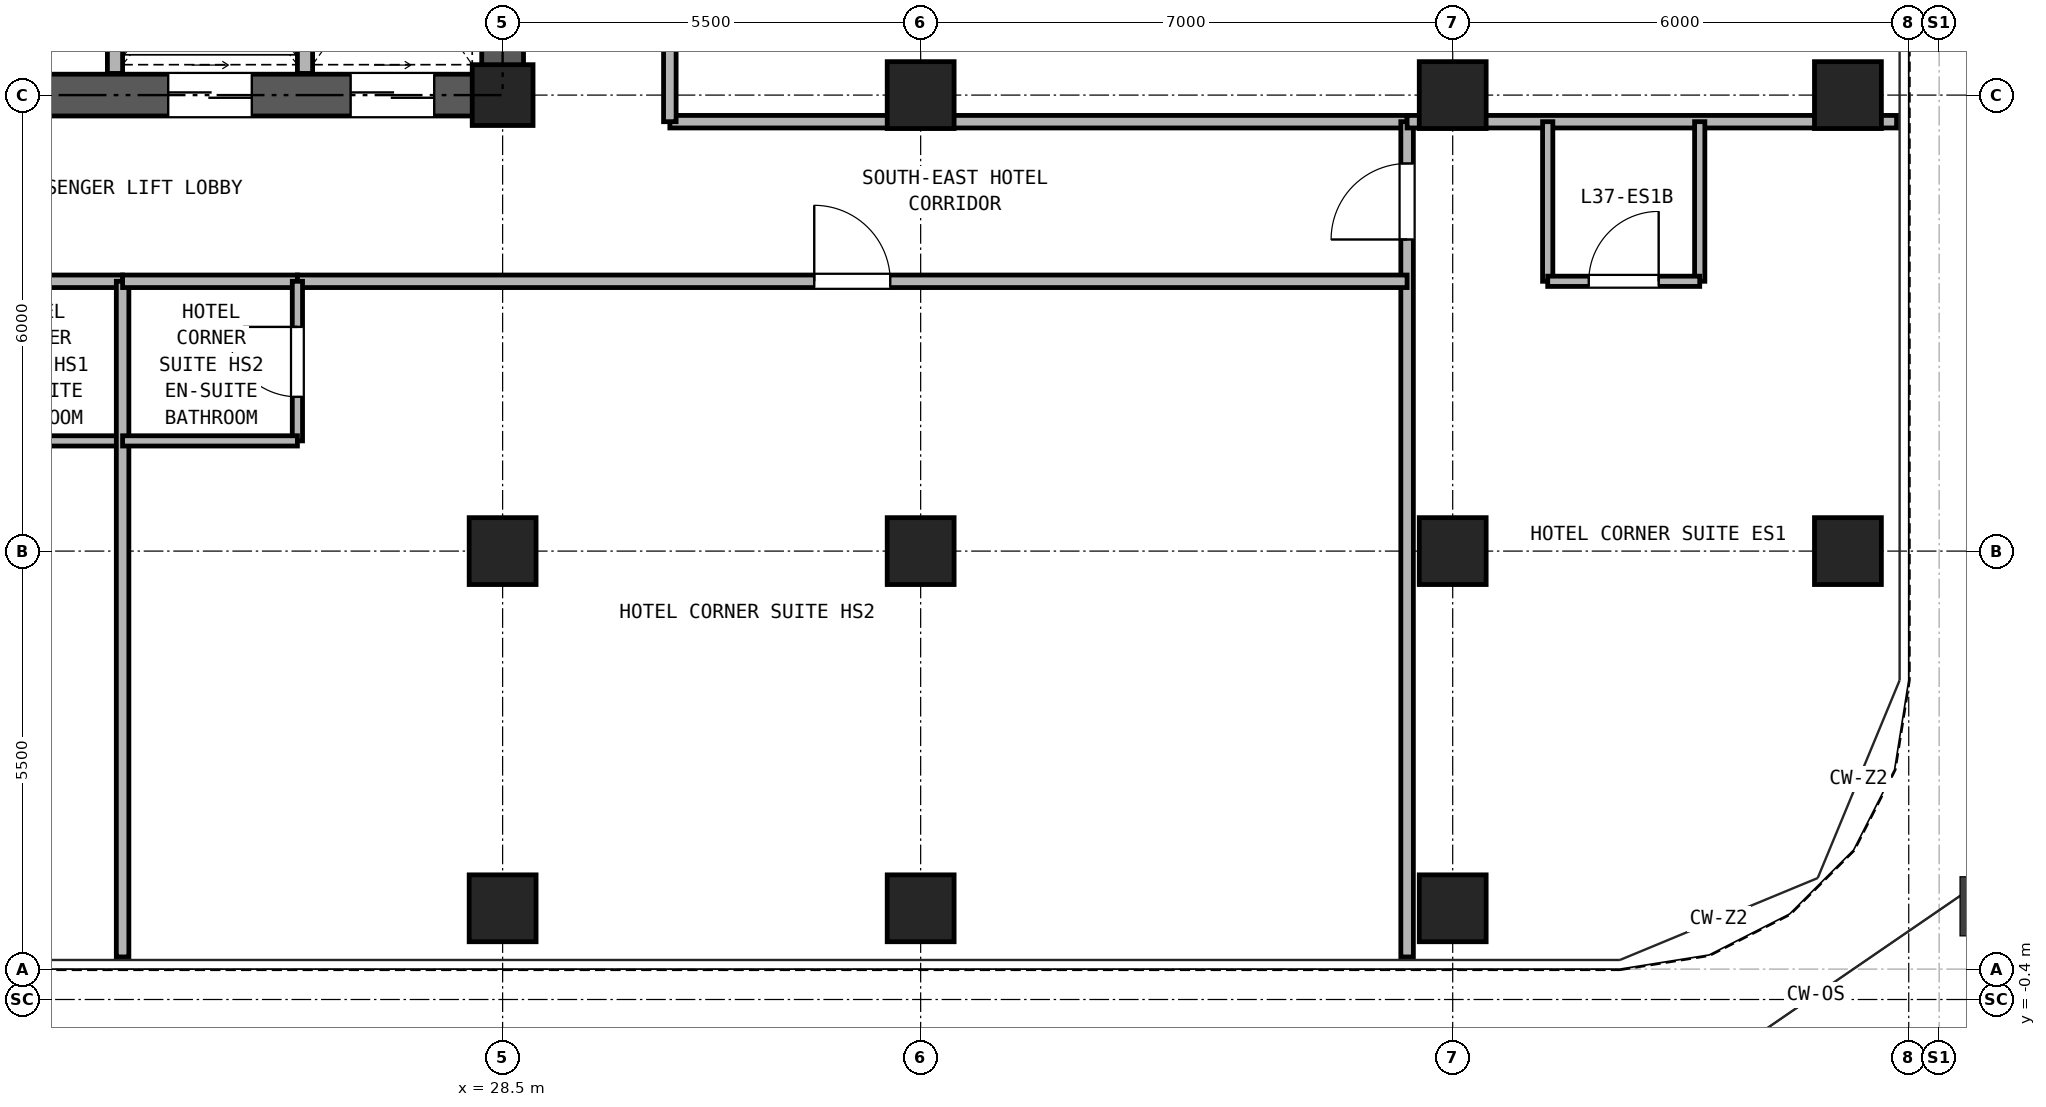
"""IFC4 building model, lengths in metres.
Left out: names, types, materials, properties, quantities, classifications, styles, units other than length and angle.
Written with IfcOpenShell. Run it as: python <this file> out.ifc"""

import sys

from ifc_helpers import new_model, si_unit, direction, frame, frame_2d, origin, origin_2d, place, context, subcontext, project, spatial, rectangle, hollow_rectangle, extrude, source, transform, mapped, element, fill, save


model = new_model("IFC4")
c1 = context("Model", 3, precision=1e-05, world=origin(), true_north=direction((0.0, 1.0)))
c2 = subcontext(c1, "Body", "Model", "MODEL_VIEW")
j1 = project(units=[si_unit("LENGTHUNIT", "METRE"), si_unit("PLANEANGLEUNIT", "RADIAN")], contexts=[c1])
p1 = place(None, origin())
s1 = spatial("IfcSite", under=j1, at=p1, CompositionType="ELEMENT")
p2 = place(p1, origin())
s2 = spatial("IfcBuilding", under=s1, at=p2, CompositionType="ELEMENT")
p3 = place(p2, frame((0.0, 0.0, 134.3)))
s3 = spatial("IfcBuildingStorey", under=s2, at=p3, CompositionType="ELEMENT", Elevation=134.3)
m1 = source(origin(), c2, "Body", "SweptSolid", [
    extrude(hollow_rectangle(XDim=0.88, YDim=0.88, WallThickness=0.05, at=origin_2d()), origin(), (0.0, 0.0, 1.0), 2.95),
])
for number, where, z_axis, x_axis in (
    (1, (28.5, 0.8, 0.0), (0.0, 0.0, 1.0), (1.0, 0.0, 0.0)),
    (2, (34.0, 0.8, 0.0), (0.0, 0.0, 1.0), (1.0, 0.0, 0.0)),
    (3, (41.0, 0.8, 0.0), (0.0, 0.0, 1.0), (1.0, 0.0, 0.0)),
    (4, (46.2, 5.5, 0.0), (0.0, 0.0, 1.0), (1.0, 0.0, 0.0)),
    (5, (46.2, 11.5, 0.0), (0.0, 0.0, 1.0), (1.0, 0.0, 0.0)),
    (6, (28.5, 5.5, 0.0), (0.0, 0.0, 1.0), (1.0, 0.0, 0.0)),
):
    element("IfcColumn", number, at=place(p3, frame(where, z_axis=z_axis, x_axis=x_axis)), inside=s3, PredefinedType="COLUMN", context=c2, shape_type="MappedRepresentation", body=[
        mapped(m1, transform((0.0, 0.0, 0.0), x_axis=(1.0, 0.0, 0.0), y_axis=(0.0, 1.0, 0.0), z_axis=(0.0, 0.0, 1.0), scale=1.0)),
    ])
m2 = source(origin(), c2, "Body", "SweptSolid", [
    extrude(hollow_rectangle(XDim=0.8, YDim=0.8, WallThickness=0.045, at=origin_2d()), origin(), (0.0, 0.0, 1.0), 2.95),
])
p4 = place(p3, frame((28.5, 11.5, 0.0), z_axis=(0.0, 0.0, 1.0), x_axis=(1.0, 0.0, 0.0)))
e7 = element("IfcColumn", 7, at=p4, inside=s3, PredefinedType="COLUMN", context=c2, shape_type="MappedRepresentation", body=[
    mapped(m2, transform((0.0, 0.0, 0.0), x_axis=(1.0, 0.0, 0.0), y_axis=(0.0, 1.0, 0.0), z_axis=(0.0, 0.0, 1.0), scale=1.0)),
])
for number, where, z_axis, x_axis in (
    (8, (34.0, 5.5, 0.0), (0.0, 0.0, 1.0), (1.0, 0.0, 0.0)),
    (9, (34.0, 11.5, 0.0), (0.0, 0.0, 1.0), (1.0, 0.0, 0.0)),
    (10, (41.0, 5.5, 0.0), (0.0, 0.0, 1.0), (1.0, 0.0, 0.0)),
    (11, (41.0, 11.5, 0.0), (0.0, 0.0, 1.0), (1.0, 0.0, 0.0)),
):
    element("IfcColumn", number, at=place(p3, frame(where, z_axis=z_axis, x_axis=x_axis)), inside=s3, PredefinedType="COLUMN", context=c2, shape_type="MappedRepresentation", body=[
        mapped(m1, transform((0.0, 0.0, 0.0), x_axis=(1.0, 0.0, 0.0), y_axis=(0.0, 1.0, 0.0), z_axis=(0.0, 0.0, 1.0), scale=1.0)),
    ])
p5 = place(p3, frame((18.225, 11.5, 0.0), z_axis=(0.0, 0.0, 1.0), x_axis=(1.0, 0.0, 0.0)))
e12 = element("IfcWall", 12, at=p5, inside=s3, PredefinedType="SHEAR", context=c2, shape_type="SweptSolid", body=[
    extrude(rectangle(XDim=10.55, YDim=0.55, at=frame_2d((5.275, 0.0))), origin(), (0.0, 0.0, 1.0), 2.95),
])
p6 = place(p5, frame((2.375, 0.0, 0.0)))
e13 = element("IfcOpeningElement", 13, at=p6, cuts=e12, PredefinedType="OPENING", context=c2, shape_type="SweptSolid", body=[
    extrude(rectangle(XDim=0.95, YDim=2.15, at=frame_2d((0.475, 1.075))), frame((0.0, 0.285, 0.0), z_axis=(0.0, -1.0, 0.0), x_axis=(1.0, 0.0, 0.0)), (0.0, 0.0, 1.0), 0.57),
])
p7 = place(p5, frame((5.875, 0.0, 0.0)))
e14 = element("IfcOpeningElement", 14, at=p7, cuts=e12, PredefinedType="OPENING", context=c2, shape_type="SweptSolid", body=[
    extrude(rectangle(XDim=1.1, YDim=2.25, at=frame_2d((0.55, 1.125))), frame((0.0, 0.285, 0.0), z_axis=(0.0, -1.0, 0.0), x_axis=(1.0, 0.0, 0.0)), (0.0, 0.0, 1.0), 0.57),
])
p8 = place(p5, frame((8.275, 0.0, 0.0)))
e15 = element("IfcOpeningElement", 15, at=p8, cuts=e12, PredefinedType="OPENING", context=c2, shape_type="SweptSolid", body=[
    extrude(rectangle(XDim=1.1, YDim=2.25, at=frame_2d((0.55, 1.125))), frame((0.0, 0.285, 0.0), z_axis=(0.0, -1.0, 0.0), x_axis=(1.0, 0.0, 0.0)), (0.0, 0.0, 1.0), 0.57),
])
p9 = place(p3, frame((28.5, 11.775, 0.0), z_axis=(0.0, 0.0, 1.0), x_axis=(0.0, 1.0, 0.0)))
e16 = element("IfcWall", 16, at=p9, inside=s3, PredefinedType="SHEAR", context=c2, shape_type="SweptSolid", body=[
    extrude(rectangle(XDim=16.7, YDim=0.55, at=frame_2d((8.35, 0.0))), origin(), (0.0, 0.0, 1.0), 2.95),
])
p10 = place(p9, frame((7.375, 0.0, 0.0)))
e17 = element("IfcOpeningElement", 17, at=p10, cuts=e16, PredefinedType="OPENING", context=c2, shape_type="SweptSolid", body=[
    extrude(rectangle(XDim=1.15, YDim=2.2, at=frame_2d((0.575, 1.1))), frame((0.0, 0.285, 0.0), z_axis=(0.0, -1.0, 0.0), x_axis=(1.0, 0.0, 0.0)), (0.0, 0.0, 1.0), 0.57),
])
for number, where, z_axis, x_axis in (
    (18, (23.4, 11.785, 0.0), (0.0, 0.0, 1.0), (0.0, 1.0, 0.0)),
    (19, (25.9, 11.785, 0.0), (0.0, 0.0, 1.0), (0.0, 1.0, 0.0)),
):
    element("IfcWall", number, at=place(p3, frame(where, z_axis=z_axis, x_axis=x_axis)), inside=s3, PredefinedType="PARTITIONING", context=c2, shape_type="SweptSolid", body=[
        extrude(rectangle(XDim=3.215, YDim=0.2, at=frame_2d((1.607, 0.0))), origin(), (0.0, 0.0, 1.0), 2.95),
    ])
p11 = place(p3, frame((30.7, 11.15, 0.0), z_axis=(0.0, 0.0, 1.0), x_axis=(1.0, 0.0, 0.0)))
e20 = element("IfcWall", 20, at=p11, inside=s3, PredefinedType="PARTITIONING", context=c2, shape_type="SweptSolid", body=[
    extrude(rectangle(XDim=9.7, YDim=0.165, at=frame_2d((4.85, 0.0))), origin(), (0.0, 0.0, 1.0), 2.95),
])
p12 = place(p3, frame((30.7, 11.15, 0.0), z_axis=(0.0, 0.0, 1.0), x_axis=(0.0, 1.0, 0.0)))
e21 = element("IfcWall", 21, at=p12, inside=s3, PredefinedType="PARTITIONING", context=c2, shape_type="SweptSolid", body=[
    extrude(rectangle(XDim=18.7, YDim=0.165, at=frame_2d((9.35, 0.0))), origin(), (0.0, 0.0, 1.0), 2.95),
])
p13 = place(p12, frame((4.175, 0.0, 0.0)))
e22 = element("IfcOpeningElement", 22, at=p13, cuts=e21, PredefinedType="OPENING", context=c2, shape_type="SweptSolid", body=[
    extrude(rectangle(XDim=0.95, YDim=2.15, at=frame_2d((0.475, 1.075))), frame((0.0, 0.093, 0.0), z_axis=(0.0, -1.0, 0.0), x_axis=(1.0, 0.0, 0.0)), (0.0, 0.0, 1.0), 0.185),
])
p14 = place(p12, frame((13.525, 0.0, 0.0)))
e23 = element("IfcOpeningElement", 23, at=p14, cuts=e21, PredefinedType="OPENING", context=c2, shape_type="SweptSolid", body=[
    extrude(rectangle(XDim=0.95, YDim=2.15, at=frame_2d((0.475, 1.075))), frame((0.0, 0.093, 0.0), z_axis=(0.0, -1.0, 0.0), x_axis=(1.0, 0.0, 0.0)), (0.0, 0.0, 1.0), 0.185),
])
p15 = place(p3, frame((40.4, 0.16, 0.0), z_axis=(0.0, 0.0, 1.0), x_axis=(0.0, 1.0, 0.0)))
e24 = element("IfcWall", 24, at=p15, inside=s3, PredefinedType="PARTITIONING", context=c2, shape_type="SweptSolid", body=[
    extrude(rectangle(XDim=10.99, YDim=0.165, at=frame_2d((5.495, 0.0))), origin(), (0.0, 0.0, 1.0), 2.95),
])
p16 = place(p15, frame((9.44, 0.0, 0.0)))
e25 = element("IfcOpeningElement", 25, at=p16, cuts=e24, PredefinedType="OPENING", context=c2, shape_type="SweptSolid", body=[
    extrude(rectangle(XDim=1.0, YDim=2.15, at=frame_2d((0.5, 1.075))), frame((0.0, 0.093, 0.0), z_axis=(0.0, -1.0, 0.0), x_axis=(1.0, 0.0, 0.0)), (0.0, 0.0, 1.0), 0.185),
])
p17 = place(p3, frame((40.4, 11.15, 0.0), z_axis=(0.0, 0.0, 1.0), x_axis=(1.0, 0.0, 0.0)))
e26 = element("IfcWall", 26, at=p17, inside=s3, PredefinedType="PARTITIONING", context=c2, shape_type="SweptSolid", body=[
    extrude(rectangle(XDim=6.44, YDim=0.165, at=frame_2d((3.22, 0.0))), origin(), (0.0, 0.0, 1.0), 2.95),
])
for number, where, z_axis, x_axis in (
    (27, (42.25, 9.05, 0.0), (0.0, 0.0, 1.0), (0.0, 1.0, 0.0)),
    (28, (44.25, 9.05, 0.0), (0.0, 0.0, 1.0), (0.0, 1.0, 0.0)),
):
    element("IfcWall", number, at=place(p3, frame(where, z_axis=z_axis, x_axis=x_axis)), inside=s3, PredefinedType="PARTITIONING", context=c2, shape_type="SweptSolid", body=[
        extrude(rectangle(XDim=2.1, YDim=0.135, at=frame_2d((1.05, 0.0))), origin(), (0.0, 0.0, 1.0), 2.95),
    ])
p18 = place(p3, frame((42.25, 9.05, 0.0), z_axis=(0.0, 0.0, 1.0), x_axis=(1.0, 0.0, 0.0)))
e29 = element("IfcWall", 29, at=p18, inside=s3, PredefinedType="PARTITIONING", context=c2, shape_type="SweptSolid", body=[
    extrude(rectangle(XDim=2.0, YDim=0.135, at=frame_2d((1.0, 0.0))), origin(), (0.0, 0.0, 1.0), 2.95),
])
p19 = place(p18, frame((0.54, 0.0, 0.0)))
e30 = element("IfcOpeningElement", 30, at=p19, cuts=e29, PredefinedType="OPENING", context=c2, shape_type="SweptSolid", body=[
    extrude(rectangle(XDim=0.92, YDim=2.1, at=frame_2d((0.46, 1.05))), frame((0.0, 0.077, 0.0), z_axis=(0.0, -1.0, 0.0), x_axis=(1.0, 0.0, 0.0)), (0.0, 0.0, 1.0), 0.155),
])
p20 = place(p3, frame((21.2, 9.05, 0.0), z_axis=(0.0, 0.0, 1.0), x_axis=(1.0, 0.0, 0.0)))
e31 = element("IfcWall", 31, at=p20, inside=s3, PredefinedType="PARTITIONING", context=c2, shape_type="SweptSolid", body=[
    extrude(rectangle(XDim=2.3, YDim=0.165, at=frame_2d((1.15, 0.0))), origin(), (0.0, 0.0, 1.0), 2.95),
])
p21 = place(p3, frame((21.2, 6.95, 0.0), z_axis=(0.0, 0.0, 1.0), x_axis=(1.0, 0.0, 0.0)))
e32 = element("IfcWall", 32, at=p21, inside=s3, PredefinedType="PARTITIONING", context=c2, shape_type="SweptSolid", body=[
    extrude(rectangle(XDim=2.3, YDim=0.135, at=frame_2d((1.15, 0.0))), origin(), (0.0, 0.0, 1.0), 2.95),
])
p22 = place(p3, frame((23.5, 0.16, 0.0), z_axis=(0.0, 0.0, 1.0), x_axis=(0.0, 1.0, 0.0)))
e33 = element("IfcWall", 33, at=p22, inside=s3, PredefinedType="PARTITIONING", context=c2, shape_type="SweptSolid", body=[
    extrude(rectangle(XDim=8.89, YDim=0.165, at=frame_2d((4.445, 0.0))), origin(), (0.0, 0.0, 1.0), 2.95),
])
p23 = place(p3, frame((23.5, 9.05, 0.0), z_axis=(0.0, 0.0, 1.0), x_axis=(1.0, 0.0, 0.0)))
e34 = element("IfcWall", 34, at=p23, inside=s3, PredefinedType="PARTITIONING", context=c2, shape_type="SweptSolid", body=[
    extrude(rectangle(XDim=2.3, YDim=0.165, at=frame_2d((1.15, 0.0))), origin(), (0.0, 0.0, 1.0), 2.95),
])
p24 = place(p3, frame((25.8, 9.05, 0.0), z_axis=(0.0, 0.0, 1.0), x_axis=(1.0, 0.0, 0.0)))
e35 = element("IfcWall", 35, at=p24, inside=s3, PredefinedType="PARTITIONING", context=c2, shape_type="SweptSolid", body=[
    extrude(rectangle(XDim=14.6, YDim=0.165, at=frame_2d((7.3, 0.0))), origin(), (0.0, 0.0, 1.0), 2.95),
])
p25 = place(p24, frame((6.8, 0.0, 0.0)))
e36 = element("IfcOpeningElement", 36, at=p25, cuts=e35, PredefinedType="OPENING", context=c2, shape_type="SweptSolid", body=[
    extrude(rectangle(XDim=1.0, YDim=2.15, at=frame_2d((0.5, 1.075))), frame((0.0, 0.093, 0.0), z_axis=(0.0, -1.0, 0.0), x_axis=(1.0, 0.0, 0.0)), (0.0, 0.0, 1.0), 0.185),
])
p26 = place(p3, frame((25.8, 6.95, 0.0), z_axis=(0.0, 0.0, 1.0), x_axis=(0.0, 1.0, 0.0)))
e37 = element("IfcWall", 37, at=p26, inside=s3, PredefinedType="PARTITIONING", context=c2, shape_type="SweptSolid", body=[
    extrude(rectangle(XDim=2.1, YDim=0.135, at=frame_2d((1.05, 0.0))), origin(), (0.0, 0.0, 1.0), 2.95),
])
p27 = place(p26, frame((0.58, 0.0, 0.0)))
e38 = element("IfcOpeningElement", 38, at=p27, cuts=e37, PredefinedType="OPENING", context=c2, shape_type="SweptSolid", body=[
    extrude(rectangle(XDim=0.92, YDim=2.1, at=frame_2d((0.46, 1.05))), frame((0.0, 0.077, 0.0), z_axis=(0.0, -1.0, 0.0), x_axis=(1.0, 0.0, 0.0)), (0.0, 0.0, 1.0), 0.155),
])
p28 = place(p3, frame((23.5, 6.95, 0.0), z_axis=(0.0, 0.0, 1.0), x_axis=(1.0, 0.0, 0.0)))
e39 = element("IfcWall", 39, at=p28, inside=s3, PredefinedType="PARTITIONING", context=c2, shape_type="SweptSolid", body=[
    extrude(rectangle(XDim=2.3, YDim=0.135, at=frame_2d((1.15, 0.0))), origin(), (0.0, 0.0, 1.0), 2.95),
])
p29 = place(p7, frame((1.1, 0.0, 0.0), z_axis=(0.0, 0.0, 1.0), x_axis=(-1.0, 0.0, 0.0)))
e40 = element("IfcDoor", 40, at=p29, inside=s3, OperationType="DOUBLE_DOOR_SLIDING", PredefinedType="DOOR", context=c2, shape_type="SweptSolid", body=[
    extrude(rectangle(XDim=1.1, YDim=2.25, at=frame_2d((0.55, 1.125))), frame((0.0, 0.025, 0.0), z_axis=(0.0, -1.0, 0.0), x_axis=(1.0, 0.0, 0.0)), (0.0, 0.0, 1.0), 0.05),
])
fill(e14, e40)
p30 = place(p8, frame((1.1, 0.0, 0.0), z_axis=(0.0, 0.0, 1.0), x_axis=(-1.0, 0.0, 0.0)))
e41 = element("IfcDoor", 41, at=p30, inside=s3, OperationType="DOUBLE_DOOR_SLIDING", PredefinedType="DOOR", context=c2, shape_type="SweptSolid", body=[
    extrude(rectangle(XDim=1.1, YDim=2.25, at=frame_2d((0.55, 1.125))), frame((0.0, 0.025, 0.0), z_axis=(0.0, -1.0, 0.0), x_axis=(1.0, 0.0, 0.0)), (0.0, 0.0, 1.0), 0.05),
])
fill(e15, e41)
p31 = place(p19, origin())
e42 = element("IfcDoor", 42, at=p31, inside=s3, OperationType="SINGLE_SWING_RIGHT", PredefinedType="DOOR", context=c2, shape_type="SweptSolid", body=[
    extrude(rectangle(XDim=0.92, YDim=2.1, at=frame_2d((0.46, 1.05))), frame((0.0, 0.025, 0.0), z_axis=(0.0, -1.0, 0.0), x_axis=(1.0, 0.0, 0.0)), (0.0, 0.0, 1.0), 0.05),
])
fill(e30, e42)
p32 = place(p16, frame((1.0, 0.0, 0.0), z_axis=(0.0, 0.0, 1.0), x_axis=(-1.0, 0.0, 0.0)))
e43 = element("IfcDoor", 43, at=p32, inside=s3, OperationType="SINGLE_SWING_LEFT", PredefinedType="DOOR", context=c2, shape_type="SweptSolid", body=[
    extrude(rectangle(XDim=1.0, YDim=2.15, at=frame_2d((0.5, 1.075))), frame((0.0, 0.025, 0.0), z_axis=(0.0, -1.0, 0.0), x_axis=(1.0, 0.0, 0.0)), (0.0, 0.0, 1.0), 0.05),
])
fill(e25, e43)
p33 = place(p27, frame((0.92, 0.0, 0.0), z_axis=(0.0, 0.0, 1.0), x_axis=(-1.0, 0.0, 0.0)))
e44 = element("IfcDoor", 44, at=p33, inside=s3, OperationType="SINGLE_SWING_RIGHT", PredefinedType="DOOR", context=c2, shape_type="SweptSolid", body=[
    extrude(rectangle(XDim=0.92, YDim=2.1, at=frame_2d((0.46, 1.05))), frame((0.0, 0.025, 0.0), z_axis=(0.0, -1.0, 0.0), x_axis=(1.0, 0.0, 0.0)), (0.0, 0.0, 1.0), 0.05),
])
fill(e38, e44)
p34 = place(p25, frame((1.0, 0.0, 0.0), z_axis=(0.0, 0.0, 1.0), x_axis=(-1.0, 0.0, 0.0)))
e45 = element("IfcDoor", 45, at=p34, inside=s3, OperationType="SINGLE_SWING_LEFT", PredefinedType="DOOR", context=c2, shape_type="SweptSolid", body=[
    extrude(rectangle(XDim=1.0, YDim=2.15, at=frame_2d((0.5, 1.075))), frame((0.0, 0.025, 0.0), z_axis=(0.0, -1.0, 0.0), x_axis=(1.0, 0.0, 0.0)), (0.0, 0.0, 1.0), 0.05),
])
fill(e36, e45)
save(model, sys.argv[1])
